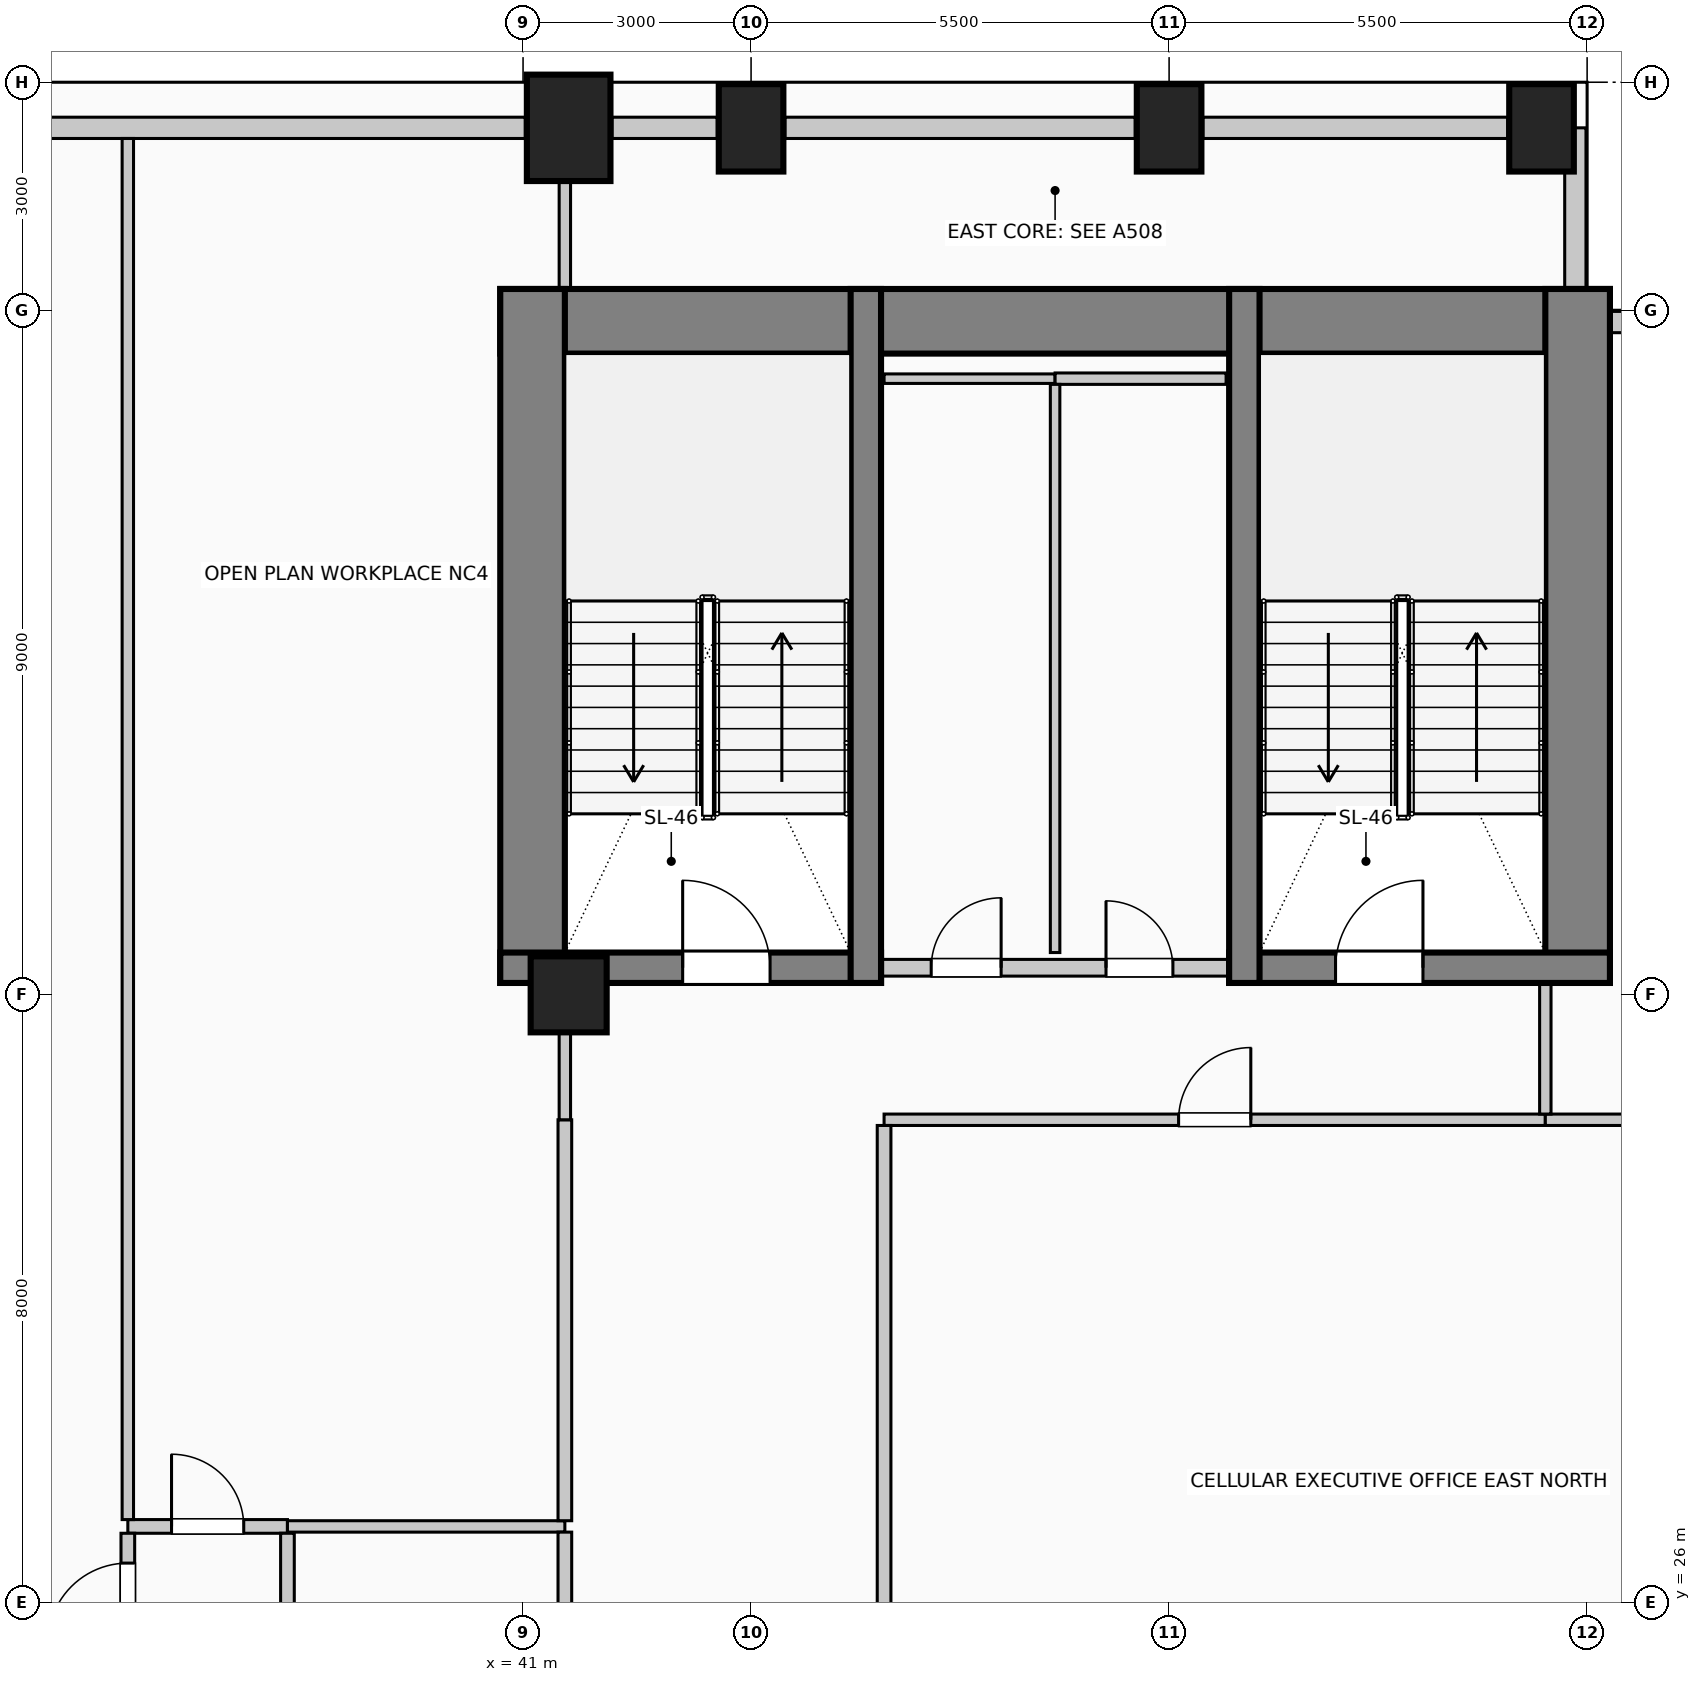
"""IFC4 building model, lengths in metres.
Left out: names, types, materials, properties, quantities, classifications, styles, units other than length and angle.
Written with IfcOpenShell. Run it as: python <this file> out.ifc"""

import sys

from ifc_helpers import new_model, si_unit, direction, frame, frame_2d, origin, origin_2d, place, context, subcontext, project, spatial, rectangle, circle, extrude, element, fill, save


model = new_model("IFC4")
c1 = context("Model", 3, precision=1e-05, world=origin(), true_north=direction((0.0, 1.0)))
c2 = subcontext(c1, "Body", "Model", "MODEL_VIEW")
j1 = project(units=[si_unit("LENGTHUNIT", "METRE"), si_unit("PLANEANGLEUNIT", "RADIAN")], contexts=[c1])
p1 = place(None, origin())
s1 = spatial("IfcSite", under=j1, at=p1, CompositionType="ELEMENT")
p2 = place(p1, origin())
s2 = spatial("IfcBuilding", under=s1, at=p2, CompositionType="ELEMENT")
p3 = place(p2, frame((0.0, 0.0, 152.6)))
s3 = spatial("IfcBuildingStorey", under=s2, at=p3, CompositionType="ELEMENT", Elevation=152.6)
p4 = place(p3, frame((40.7, 42.855, 0.0), z_axis=(0.0, 0.0, 1.0), x_axis=(1.0, 0.0, 0.0)))
e1 = element("IfcWall", 1, at=p4, inside=s3, PredefinedType="SHEAR", context=c2, shape_type="SweptSolid", body=[
    extrude(rectangle(XDim=14.6, YDim=0.85, at=frame_2d((7.3, 0.0))), origin(), (0.0, 0.0, 1.0), 4.0),
])
for number, where, z_axis, x_axis in (
    (2, (41.125, 34.15, 0.0), (0.0, 0.0, 1.0), (0.0, 1.0, 0.0)),
    (3, (54.875, 34.15, 0.0), (0.0, 0.0, 1.0), (0.0, 1.0, 0.0)),
):
    element("IfcWall", number, at=place(p3, frame(where, z_axis=z_axis, x_axis=x_axis)), inside=s3, PredefinedType="SHEAR", context=c2, shape_type="SweptSolid", body=[
        extrude(rectangle(XDim=9.13, YDim=0.85, at=frame_2d((4.565, 0.0))), origin(), (0.0, 0.0, 1.0), 4.0),
    ])
p5 = place(p3, frame((40.7, 34.35, 0.0), z_axis=(0.0, 0.0, 1.0), x_axis=(1.0, 0.0, 0.0)))
e4 = element("IfcWall", 4, at=p5, inside=s3, PredefinedType="SHEAR", context=c2, shape_type="SweptSolid", body=[
    extrude(rectangle(XDim=5.01, YDim=0.4, at=frame_2d((2.505, 0.0))), origin(), (0.0, 0.0, 1.0), 4.0),
])
p6 = place(p5, frame((2.4, 0.0, 0.0)))
e5 = element("IfcOpeningElement", 5, at=p6, cuts=e4, PredefinedType="OPENING", context=c2, shape_type="SweptSolid", body=[
    extrude(rectangle(XDim=1.15, YDim=2.2, at=frame_2d((0.575, 1.1))), frame((0.0, 0.21, 0.0), z_axis=(0.0, -1.0, 0.0), x_axis=(1.0, 0.0, 0.0)), (0.0, 0.0, 1.0), 0.42),
])
p7 = place(p3, frame((45.51, 34.15, 0.0), z_axis=(0.0, 0.0, 1.0), x_axis=(0.0, 1.0, 0.0)))
e6 = element("IfcWall", 6, at=p7, inside=s3, PredefinedType="SHEAR", context=c2, shape_type="SweptSolid", body=[
    extrude(rectangle(XDim=9.13, YDim=0.4, at=frame_2d((4.565, 0.0))), origin(), (0.0, 0.0, 1.0), 4.0),
])
p8 = place(p3, frame((50.29, 34.35, 0.0), z_axis=(0.0, 0.0, 1.0), x_axis=(1.0, 0.0, 0.0)))
e7 = element("IfcWall", 7, at=p8, inside=s3, PredefinedType="SHEAR", context=c2, shape_type="SweptSolid", body=[
    extrude(rectangle(XDim=5.01, YDim=0.4, at=frame_2d((2.505, 0.0))), origin(), (0.0, 0.0, 1.0), 4.0),
])
p9 = place(p8, frame((1.4, 0.0, 0.0)))
e8 = element("IfcOpeningElement", 8, at=p9, cuts=e7, PredefinedType="OPENING", context=c2, shape_type="SweptSolid", body=[
    extrude(rectangle(XDim=1.15, YDim=2.2, at=frame_2d((0.575, 1.1))), frame((0.0, 0.21, 0.0), z_axis=(0.0, -1.0, 0.0), x_axis=(1.0, 0.0, 0.0)), (0.0, 0.0, 1.0), 0.42),
])
p10 = place(p3, frame((50.49, 34.15, 0.0), z_axis=(0.0, 0.0, 1.0), x_axis=(0.0, 1.0, 0.0)))
e9 = element("IfcWall", 9, at=p10, inside=s3, PredefinedType="SHEAR", context=c2, shape_type="SweptSolid", body=[
    extrude(rectangle(XDim=9.13, YDim=0.4, at=frame_2d((4.565, 0.0))), origin(), (0.0, 0.0, 1.0), 4.0),
])
p11 = place(p3, frame((41.6, 45.4, 0.0), z_axis=(0.0, 0.0, 1.0), x_axis=(1.0, 0.0, 0.0)))
e10 = element("IfcColumn", 10, at=p11, inside=s3, PredefinedType="COLUMN", context=c2, shape_type="SweptSolid", body=[
    extrude(rectangle(XDim=1.1, YDim=1.4, at=origin_2d()), origin(), (0.0, 0.0, 1.0), 4.0),
])
for number, where, z_axis, x_axis in (
    (11, (44.0, 45.4, 0.0), (0.0, 0.0, 1.0), (1.0, 0.0, 0.0)),
    (12, (49.5, 45.4, 0.0), (0.0, 0.0, 1.0), (1.0, 0.0, 0.0)),
    (13, (54.4, 45.4, 0.0), (0.0, 0.0, 1.0), (1.0, 0.0, 0.0)),
):
    element("IfcColumn", number, at=place(p3, frame(where, z_axis=z_axis, x_axis=x_axis)), inside=s3, PredefinedType="COLUMN", context=c2, shape_type="SweptSolid", body=[
        extrude(rectangle(XDim=0.85, YDim=1.15, at=origin_2d()), origin(), (0.0, 0.0, 1.0), 4.0),
    ])
p12 = place(p3, frame((41.6, 34.0, 0.0), z_axis=(0.0, 0.0, 1.0), x_axis=(1.0, 0.0, 0.0)))
e14 = element("IfcColumn", 14, at=p12, inside=s3, PredefinedType="COLUMN", context=c2, shape_type="SweptSolid", body=[
    extrude(circle(Radius=0.5, at=origin_2d()), origin(), (0.0, 0.0, 1.0), 4.0),
])
p13 = place(p3, frame((34.57, 45.4, 0.0), z_axis=(0.0, 0.0, 1.0), x_axis=(1.0, 0.0, 0.0)))
e15 = element("IfcWall", 15, at=p13, inside=s3, PredefinedType="SOLIDWALL", context=c2, shape_type="SweptSolid", body=[
    extrude(rectangle(XDim=6.46, YDim=0.28, at=frame_2d((3.23, 0.0))), origin(), (0.0, 0.0, 1.0), 2.875),
])
p14 = place(p3, frame((42.17, 45.4, 0.0), z_axis=(0.0, 0.0, 1.0), x_axis=(1.0, 0.0, 0.0)))
e16 = element("IfcWall", 16, at=p14, inside=s3, PredefinedType="SOLIDWALL", context=c2, shape_type="SweptSolid", body=[
    extrude(rectangle(XDim=1.385, YDim=0.28, at=frame_2d((0.692, 0.0))), origin(), (0.0, 0.0, 1.0), 2.875),
])
p15 = place(p3, frame((44.445, 45.4, 0.0), z_axis=(0.0, 0.0, 1.0), x_axis=(1.0, 0.0, 0.0)))
e17 = element("IfcWall", 17, at=p15, inside=s3, PredefinedType="SOLIDWALL", context=c2, shape_type="SweptSolid", body=[
    extrude(rectangle(XDim=4.61, YDim=0.28, at=frame_2d((2.305, 0.0))), origin(), (0.0, 0.0, 1.0), 2.875),
])
p16 = place(p3, frame((49.945, 45.4, 0.0), z_axis=(0.0, 0.0, 1.0), x_axis=(1.0, 0.0, 0.0)))
e18 = element("IfcWall", 18, at=p16, inside=s3, PredefinedType="SOLIDWALL", context=c2, shape_type="SweptSolid", body=[
    extrude(rectangle(XDim=4.01, YDim=0.28, at=frame_2d((2.005, 0.0))), origin(), (0.0, 0.0, 1.0), 2.875),
])
p17 = place(p3, frame((54.845, 45.4, 0.0), z_axis=(0.0, 0.0, 1.0), x_axis=(0.0, -1.0, 0.0)))
e19 = element("IfcWall", 19, at=p17, inside=s3, PredefinedType="SOLIDWALL", context=c2, shape_type="SweptSolid", body=[
    extrude(rectangle(XDim=2.115, YDim=0.28, at=frame_2d((1.058, 0.0))), origin(), (0.0, 0.0, 1.0), 3.725),
])
p18 = place(p3, frame((55.305, 42.845, 0.0), z_axis=(0.0, 0.0, 1.0), x_axis=(1.0, 0.0, 0.0)))
e20 = element("IfcWall", 20, at=p18, inside=s3, PredefinedType="SOLIDWALL", context=c2, shape_type="SweptSolid", body=[
    extrude(rectangle(XDim=2.095, YDim=0.28, at=frame_2d((1.047, 0.0))), origin(), (0.0, 0.0, 1.0), 3.725),
])
p19 = place(p3, frame((45.72, 34.35, 0.0), z_axis=(0.0, 0.0, 1.0), x_axis=(1.0, 0.0, 0.0)))
e21 = element("IfcWall", 21, at=p19, inside=s3, PredefinedType="PARTITIONING", context=c2, shape_type="SweptSolid", body=[
    extrude(rectangle(XDim=4.56, YDim=0.22, at=frame_2d((2.28, 0.0))), origin(), (0.0, 0.0, 1.0), 3.725),
])
p20 = place(p19, frame((0.65, 0.0, 0.0)))
e22 = element("IfcOpeningElement", 22, at=p20, cuts=e21, PredefinedType="OPENING", context=c2, shape_type="SweptSolid", body=[
    extrude(rectangle(XDim=0.92, YDim=2.1, at=frame_2d((0.46, 1.05))), frame((0.0, 0.12, 0.0), z_axis=(0.0, -1.0, 0.0), x_axis=(1.0, 0.0, 0.0)), (0.0, 0.0, 1.0), 0.24),
])
p21 = place(p19, frame((2.95, 0.0, 0.0)))
e23 = element("IfcOpeningElement", 23, at=p21, cuts=e21, PredefinedType="OPENING", context=c2, shape_type="SweptSolid", body=[
    extrude(rectangle(XDim=0.88, YDim=2.1, at=frame_2d((0.44, 1.05))), frame((0.0, 0.12, 0.0), z_axis=(0.0, -1.0, 0.0), x_axis=(1.0, 0.0, 0.0)), (0.0, 0.0, 1.0), 0.24),
])
p22 = place(p3, frame((35.8, 27.0, 0.0), z_axis=(0.0, 0.0, 1.0), x_axis=(1.0, 0.0, 0.0)))
e24 = element("IfcWall", 24, at=p22, inside=s3, PredefinedType="PARTITIONING", context=c2, shape_type="SweptSolid", body=[
    extrude(rectangle(XDim=2.1, YDim=0.18, at=frame_2d((1.05, 0.0))), origin(), (0.0, 0.0, 1.0), 3.725),
])
p23 = place(p22, frame((0.575, 0.0, 0.0)))
e25 = element("IfcOpeningElement", 25, at=p23, cuts=e24, PredefinedType="OPENING", context=c2, shape_type="SweptSolid", body=[
    extrude(rectangle(XDim=0.95, YDim=2.15, at=frame_2d((0.475, 1.075))), frame((0.0, 0.1, 0.0), z_axis=(0.0, -1.0, 0.0), x_axis=(1.0, 0.0, 0.0)), (0.0, 0.0, 1.0), 0.2),
])
p24 = place(p3, frame((37.9, 27.0, 0.0), z_axis=(0.0, 0.0, 1.0), x_axis=(1.0, 0.0, 0.0)))
e26 = element("IfcWall", 26, at=p24, inside=s3, PredefinedType="PARTITIONING", context=c2, shape_type="SweptSolid", body=[
    extrude(rectangle(XDim=3.65, YDim=0.15, at=frame_2d((1.825, 0.0))), origin(), (0.0, 0.0, 1.0), 3.725),
])
p25 = place(p3, frame((45.75, 32.35, 0.0), z_axis=(0.0, 0.0, 1.0), x_axis=(1.0, 0.0, 0.0)))
e27 = element("IfcWall", 27, at=p25, inside=s3, PredefinedType="PARTITIONING", context=c2, shape_type="SweptSolid", body=[
    extrude(rectangle(XDim=8.7, YDim=0.15, at=frame_2d((4.35, 0.0))), origin(), (0.0, 0.0, 1.0), 3.725),
])
p26 = place(p25, frame((3.875, 0.0, 0.0)))
e28 = element("IfcOpeningElement", 28, at=p26, cuts=e27, PredefinedType="OPENING", context=c2, shape_type="SweptSolid", body=[
    extrude(rectangle(XDim=0.95, YDim=2.15, at=frame_2d((0.475, 1.075))), frame((0.0, 0.085, 0.0), z_axis=(0.0, -1.0, 0.0), x_axis=(1.0, 0.0, 0.0)), (0.0, 0.0, 1.0), 0.17),
])
p27 = place(p3, frame((54.45, 32.35, 0.0), z_axis=(0.0, 0.0, 1.0), x_axis=(1.0, 0.0, 0.0)))
e29 = element("IfcWall", 29, at=p27, inside=s3, PredefinedType="PARTITIONING", context=c2, shape_type="SweptSolid", body=[
    extrude(rectangle(XDim=2.81, YDim=0.15, at=frame_2d((1.405, 0.0))), origin(), (0.0, 0.0, 1.0), 3.725),
])
p28 = place(p3, frame((45.75, 42.1, 0.0), z_axis=(0.0, 0.0, 1.0), x_axis=(1.0, 0.0, 0.0)))
e30 = element("IfcWall", 30, at=p28, inside=s3, PredefinedType="PARTITIONING", context=c2, shape_type="SweptSolid", body=[
    extrude(rectangle(XDim=2.25, YDim=0.125, at=frame_2d((1.125, 0.0))), origin(), (0.0, 0.0, 1.0), 3.725),
])
p29 = place(p3, frame((48.0, 42.1, 0.0), z_axis=(0.0, 0.0, 1.0), x_axis=(1.0, 0.0, 0.0)))
e31 = element("IfcWall", 31, at=p29, inside=s3, PredefinedType="PARTITIONING", context=c2, shape_type="SweptSolid", body=[
    extrude(rectangle(XDim=2.25, YDim=0.15, at=frame_2d((1.125, 0.0))), origin(), (0.0, 0.0, 1.0), 3.725),
])
p30 = place(p3, frame((35.8, 25.075, 0.0), z_axis=(0.0, 0.0, 1.0), x_axis=(0.0, 1.0, 0.0)))
e32 = element("IfcWall", 32, at=p30, inside=s3, PredefinedType="PARTITIONING", context=c2, shape_type="SweptSolid", body=[
    extrude(rectangle(XDim=1.835, YDim=0.18, at=frame_2d((0.917, 0.0))), origin(), (0.0, 0.0, 1.0), 3.725),
])
p31 = place(p30, frame((0.393, 0.0, 0.0)))
e33 = element("IfcOpeningElement", 33, at=p31, cuts=e32, PredefinedType="OPENING", context=c2, shape_type="SweptSolid", body=[
    extrude(rectangle(XDim=1.05, YDim=2.15, at=frame_2d((0.525, 1.075))), frame((0.0, 0.1, 0.0), z_axis=(0.0, -1.0, 0.0), x_axis=(1.0, 0.0, 0.0)), (0.0, 0.0, 1.0), 0.2),
])
p32 = place(p3, frame((35.8, 27.09, 0.0), z_axis=(0.0, 0.0, 1.0), x_axis=(0.0, 1.0, 0.0)))
e34 = element("IfcWall", 34, at=p32, inside=s3, PredefinedType="PARTITIONING", context=c2, shape_type="SweptSolid", body=[
    extrude(rectangle(XDim=18.17, YDim=0.15, at=frame_2d((9.085, 0.0))), origin(), (0.0, 0.0, 1.0), 3.725),
])
p33 = place(p3, frame((37.9, 15.74, 0.0), z_axis=(0.0, 0.0, 1.0), x_axis=(0.0, 1.0, 0.0)))
e35 = element("IfcWall", 35, at=p33, inside=s3, PredefinedType="PARTITIONING", context=c2, shape_type="SweptSolid", body=[
    extrude(rectangle(XDim=11.17, YDim=0.18, at=frame_2d((5.585, 0.0))), origin(), (0.0, 0.0, 1.0), 3.725),
])
p34 = place(p3, frame((41.55, 18.5, 0.0), z_axis=(0.0, 0.0, 1.0), x_axis=(0.0, 1.0, 0.0)))
e36 = element("IfcWall", 36, at=p34, inside=s3, PredefinedType="PARTITIONING", context=c2, shape_type="SweptSolid", body=[
    extrude(rectangle(XDim=8.425, YDim=0.18, at=frame_2d((4.212, 0.0))), origin(), (0.0, 0.0, 1.0), 3.07),
])
p35 = place(p3, frame((41.55, 27.075, 0.0), z_axis=(0.0, 0.0, 1.0), x_axis=(0.0, 1.0, 0.0)))
e37 = element("IfcWall", 37, at=p35, inside=s3, PredefinedType="PARTITIONING", context=c2, shape_type="SweptSolid", body=[
    extrude(rectangle(XDim=5.275, YDim=0.18, at=frame_2d((2.638, 0.0))), origin(), (0.0, 0.0, 1.0), 3.07),
])
p36 = place(p3, frame((41.55, 32.35, 0.0), z_axis=(0.0, 0.0, 1.0), x_axis=(0.0, 1.0, 0.0)))
e38 = element("IfcWall", 38, at=p36, inside=s3, PredefinedType="PARTITIONING", context=c2, shape_type="SweptSolid", body=[
    extrude(rectangle(XDim=1.15, YDim=0.15, at=frame_2d((0.575, 0.0))), origin(), (0.0, 0.0, 1.0), 3.07),
])
p37 = place(p3, frame((41.55, 43.28, 0.0), z_axis=(0.0, 0.0, 1.0), x_axis=(0.0, 1.0, 0.0)))
e39 = element("IfcWall", 39, at=p37, inside=s3, PredefinedType="PARTITIONING", context=c2, shape_type="SweptSolid", body=[
    extrude(rectangle(XDim=1.42, YDim=0.15, at=frame_2d((0.71, 0.0))), origin(), (0.0, 0.0, 1.0), 3.725),
])
p38 = place(p3, frame((45.75, 22.925, 0.0), z_axis=(0.0, 0.0, 1.0), x_axis=(0.0, 1.0, 0.0)))
e40 = element("IfcWall", 40, at=p38, inside=s3, PredefinedType="PARTITIONING", context=c2, shape_type="SweptSolid", body=[
    extrude(rectangle(XDim=9.35, YDim=0.18, at=frame_2d((4.675, 0.0))), origin(), (0.0, 0.0, 1.0), 3.725),
])
p39 = place(p3, frame((48.0, 34.55, 0.0), z_axis=(0.0, 0.0, 1.0), x_axis=(0.0, 1.0, 0.0)))
e41 = element("IfcWall", 41, at=p39, inside=s3, PredefinedType="PARTITIONING", context=c2, shape_type="SweptSolid", body=[
    extrude(rectangle(XDim=7.475, YDim=0.125, at=frame_2d((3.737, 0.0))), origin(), (0.0, 0.0, 1.0), 3.725),
])
p40 = place(p3, frame((54.45, 32.425, 0.0), z_axis=(0.0, 0.0, 1.0), x_axis=(0.0, 1.0, 0.0)))
e42 = element("IfcWall", 42, at=p40, inside=s3, PredefinedType="PARTITIONING", context=c2, shape_type="SweptSolid", body=[
    extrude(rectangle(XDim=1.725, YDim=0.15, at=frame_2d((0.862, 0.0))), origin(), (0.0, 0.0, 1.0), 3.725),
])
p41 = place(p6, origin())
e43 = element("IfcDoor", 43, at=p41, inside=s3, OperationType="SINGLE_SWING_LEFT", PredefinedType="DOOR", context=c2, shape_type="SweptSolid", body=[
    extrude(rectangle(XDim=1.15, YDim=2.2, at=frame_2d((0.575, 1.1))), frame((0.0, 0.025, 0.0), z_axis=(0.0, -1.0, 0.0), x_axis=(1.0, 0.0, 0.0)), (0.0, 0.0, 1.0), 0.05),
])
fill(e5, e43)
p42 = place(p20, origin())
e44 = element("IfcDoor", 44, at=p42, inside=s3, OperationType="SINGLE_SWING_RIGHT", PredefinedType="DOOR", context=c2, shape_type="SweptSolid", body=[
    extrude(rectangle(XDim=0.92, YDim=2.1, at=frame_2d((0.46, 1.05))), frame((0.0, 0.025, 0.0), z_axis=(0.0, -1.0, 0.0), x_axis=(1.0, 0.0, 0.0)), (0.0, 0.0, 1.0), 0.05),
])
fill(e22, e44)
p43 = place(p21, origin())
e45 = element("IfcDoor", 45, at=p43, inside=s3, OperationType="SINGLE_SWING_LEFT", PredefinedType="DOOR", context=c2, shape_type="SweptSolid", body=[
    extrude(rectangle(XDim=0.88, YDim=2.1, at=frame_2d((0.44, 1.05))), frame((0.0, 0.025, 0.0), z_axis=(0.0, -1.0, 0.0), x_axis=(1.0, 0.0, 0.0)), (0.0, 0.0, 1.0), 0.05),
])
fill(e23, e45)
p44 = place(p9, origin())
e46 = element("IfcDoor", 46, at=p44, inside=s3, OperationType="SINGLE_SWING_RIGHT", PredefinedType="DOOR", context=c2, shape_type="SweptSolid", body=[
    extrude(rectangle(XDim=1.15, YDim=2.2, at=frame_2d((0.575, 1.1))), frame((0.0, 0.025, 0.0), z_axis=(0.0, -1.0, 0.0), x_axis=(1.0, 0.0, 0.0)), (0.0, 0.0, 1.0), 0.05),
])
fill(e8, e46)
p45 = place(p23, origin())
e47 = element("IfcDoor", 47, at=p45, inside=s3, OperationType="SINGLE_SWING_LEFT", PredefinedType="DOOR", context=c2, shape_type="SweptSolid", body=[
    extrude(rectangle(XDim=0.95, YDim=2.15, at=frame_2d((0.475, 1.075))), frame((0.0, 0.025, 0.0), z_axis=(0.0, -1.0, 0.0), x_axis=(1.0, 0.0, 0.0)), (0.0, 0.0, 1.0), 0.05),
])
fill(e25, e47)
p46 = place(p26, origin())
e48 = element("IfcDoor", 48, at=p46, inside=s3, OperationType="SINGLE_SWING_RIGHT", PredefinedType="DOOR", context=c2, shape_type="SweptSolid", body=[
    extrude(rectangle(XDim=0.95, YDim=2.15, at=frame_2d((0.475, 1.075))), frame((0.0, 0.025, 0.0), z_axis=(0.0, -1.0, 0.0), x_axis=(1.0, 0.0, 0.0)), (0.0, 0.0, 1.0), 0.05),
])
fill(e28, e48)
p47 = place(p31, origin())
e49 = element("IfcDoor", 49, at=p47, inside=s3, OperationType="SINGLE_SWING_LEFT", PredefinedType="DOOR", context=c2, shape_type="SweptSolid", body=[
    extrude(rectangle(XDim=1.05, YDim=2.15, at=frame_2d((0.525, 1.075))), frame((0.0, 0.025, 0.0), z_axis=(0.0, -1.0, 0.0), x_axis=(1.0, 0.0, 0.0)), (0.0, 0.0, 1.0), 0.05),
])
fill(e33, e49)
save(model, sys.argv[1])
